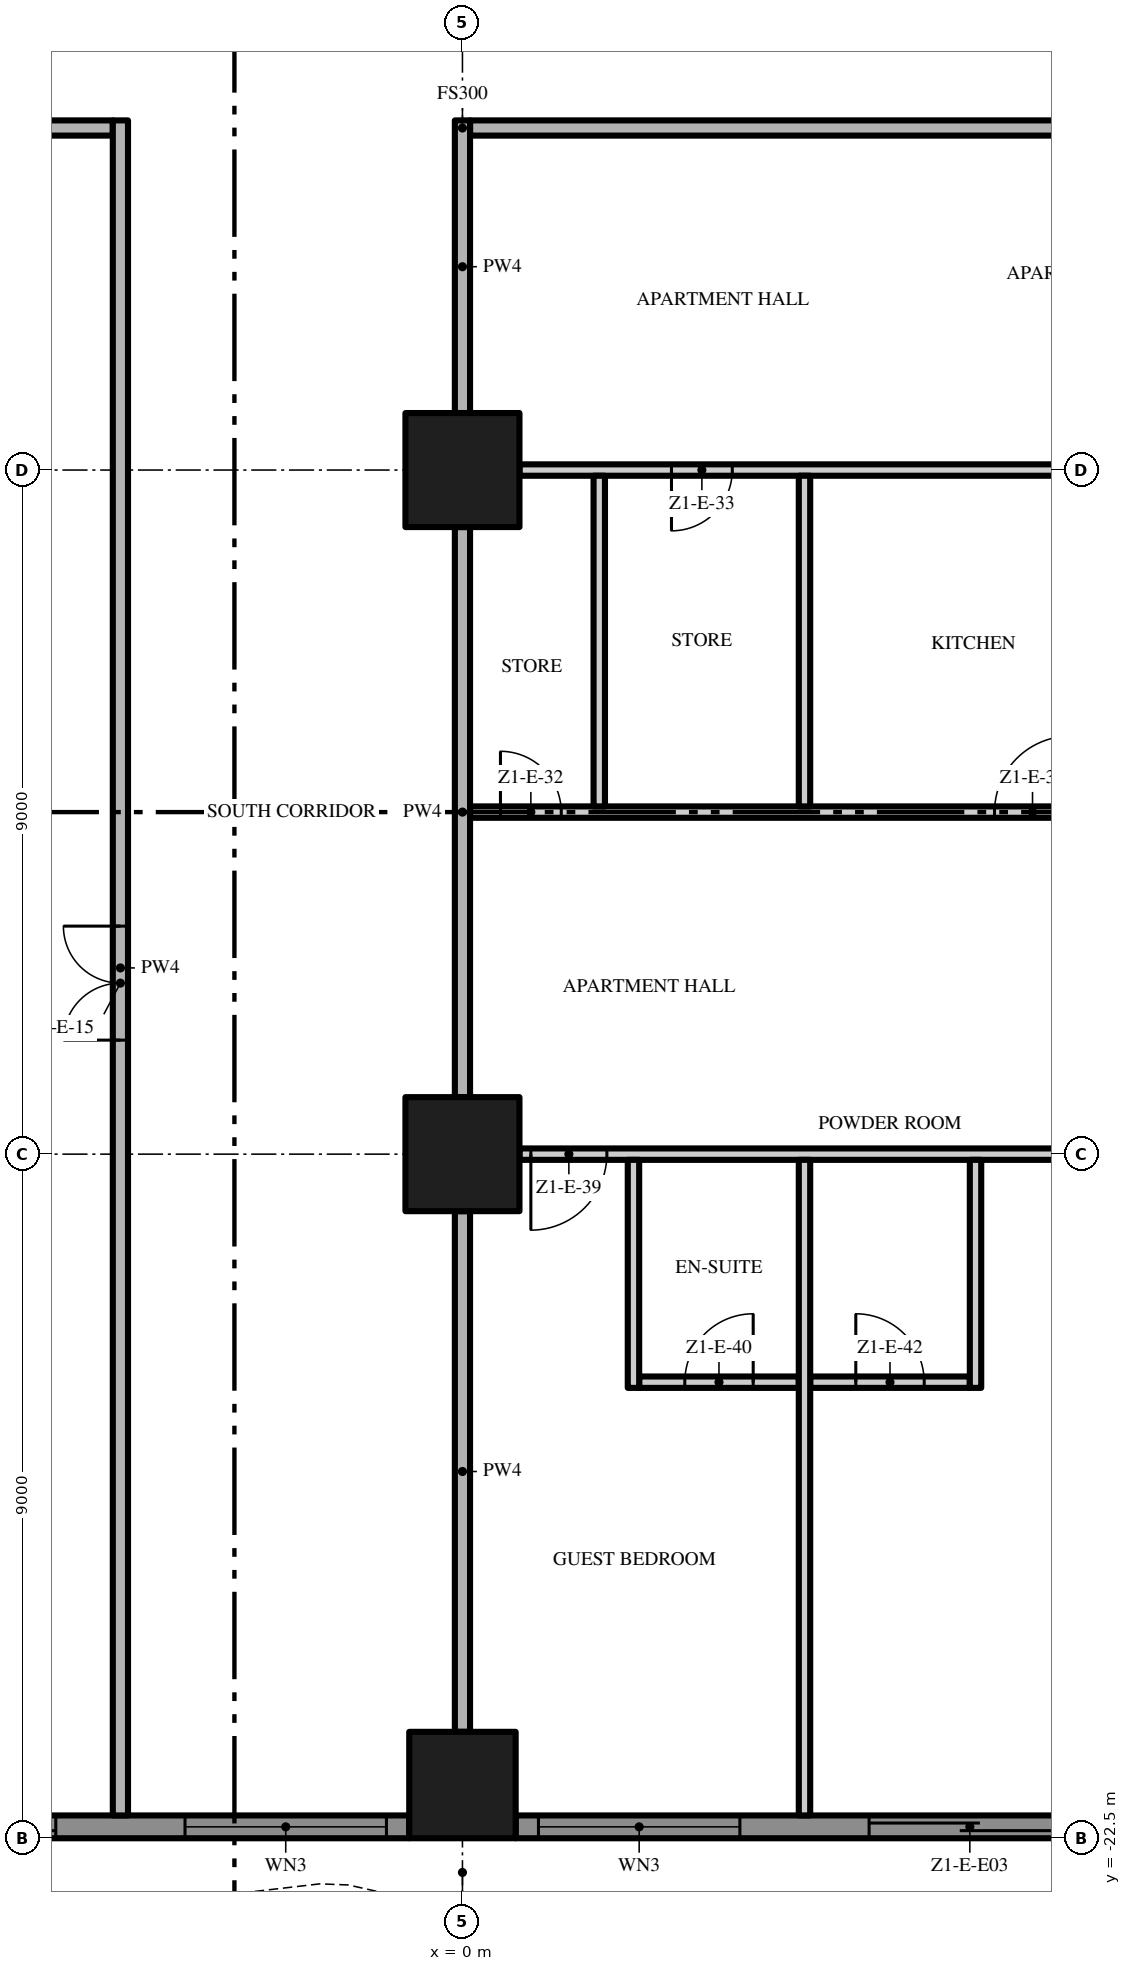
"""IFC4 building model, lengths in metres.
Left out: names, types, materials, properties, quantities, classifications, styles, units other than length and angle.
Written with IfcOpenShell. Run it as: python <this file> out.ifc"""

import sys

from ifc_helpers import new_model, si_unit, direction, frame, frame_2d, origin, origin_2d, place, context, subcontext, project, spatial, polyline, rectangle, outline, extrude, element, fill, save


model = new_model("IFC4")
c1 = context("Model", 3, precision=1e-05, world=origin(), true_north=direction((0.0, 1.0)))
c2 = subcontext(c1, "Body", "Model", "MODEL_VIEW")
j1 = project(units=[si_unit("LENGTHUNIT", "METRE"), si_unit("PLANEANGLEUNIT", "RADIAN")], contexts=[c1])
p1 = place(None, origin())
s1 = spatial("IfcSite", under=j1, at=p1, CompositionType="ELEMENT")
p2 = place(p1, origin())
s2 = spatial("IfcBuilding", under=s1, at=p2, CompositionType="ELEMENT")
p3 = place(p2, frame((0.0, 0.0, 56.8)))
s3 = spatial("IfcBuildingStorey", under=s2, at=p3, CompositionType="ELEMENT", Elevation=56.8)
p4 = place(p3, frame((0.0, -13.5, 0.0), z_axis=(0.0, 0.0, 1.0), x_axis=(1.0, 0.0, 0.0)))
e1 = element("IfcColumn", 1, at=p4, inside=s3, PredefinedType="COLUMN", context=c2, shape_type="SweptSolid", body=[
    extrude(rectangle(XDim=1.5, YDim=1.5, at=origin_2d()), origin(), (0.0, 0.0, 1.0), 3.5),
])
p5 = place(p3, frame((0.0, -21.8, 0.0), z_axis=(0.0, 0.0, 1.0), x_axis=(1.0, 0.0, 0.0)))
e2 = element("IfcColumn", 2, at=p5, inside=s3, PredefinedType="COLUMN", context=c2, shape_type="SweptSolid", body=[
    extrude(rectangle(XDim=1.4, YDim=1.4, at=origin_2d()), origin(), (0.0, 0.0, 1.0), 3.5),
])
p6 = place(p3, frame((0.0, -4.5, 0.0), z_axis=(0.0, 0.0, 1.0), x_axis=(1.0, 0.0, 0.0)))
e3 = element("IfcColumn", 3, at=p6, inside=s3, PredefinedType="COLUMN", context=c2, shape_type="SweptSolid", body=[
    extrude(rectangle(XDim=1.5, YDim=1.5, at=origin_2d()), origin(), (0.0, 0.0, 1.0), 3.5),
])
p7 = place(p3, frame((-0.7, -22.35, 0.0), z_axis=(0.0, 0.0, 1.0), x_axis=(-1.0, 0.0, 0.0)))
e4 = element("IfcWall", 4, at=p7, inside=s3, PredefinedType="SOLIDWALL", context=c2, shape_type="SweptSolid", body=[
    extrude(rectangle(XDim=7.6, YDim=0.3, at=frame_2d((3.8, 0.0))), origin(), (0.0, 0.0, 1.0), 3.5),
])
p8 = place(p7, frame((4.65, 0.0, 0.0)))
e5 = element("IfcOpeningElement", 5, at=p8, cuts=e4, PredefinedType="OPENING", context=c2, shape_type="SweptSolid", body=[
    extrude(rectangle(XDim=2.65, YDim=2.4, at=frame_2d((1.325, 1.2))), frame((0.0, 0.16, 0.0), z_axis=(0.0, -1.0, 0.0), x_axis=(1.0, 0.0, 0.0)), (0.0, 0.0, 1.0), 0.32),
])
p9 = place(p7, frame((0.3, 0.0, 0.45)))
e6 = element("IfcOpeningElement", 6, at=p9, cuts=e4, PredefinedType="OPENING", context=c2, shape_type="SweptSolid", body=[
    extrude(rectangle(XDim=2.65, YDim=2.65, at=frame_2d((1.325, 1.325))), frame((0.0, 0.16, 0.0), z_axis=(0.0, -1.0, 0.0), x_axis=(1.0, 0.0, 0.0)), (0.0, 0.0, 1.0), 0.32),
])
p10 = place(p3, frame((8.3, -22.35, 0.0), z_axis=(0.0, 0.0, 1.0), x_axis=(-1.0, 0.0, 0.0)))
e7 = element("IfcWall", 7, at=p10, inside=s3, PredefinedType="SOLIDWALL", context=c2, shape_type="SweptSolid", body=[
    extrude(rectangle(XDim=7.6, YDim=0.3, at=frame_2d((3.8, 0.0))), origin(), (0.0, 0.0, 1.0), 3.5),
])
p11 = place(p10, frame((4.65, 0.0, 0.45)))
e8 = element("IfcOpeningElement", 8, at=p11, cuts=e7, PredefinedType="OPENING", context=c2, shape_type="SweptSolid", body=[
    extrude(rectangle(XDim=2.65, YDim=2.65, at=frame_2d((1.325, 1.325))), frame((0.0, 0.16, 0.0), z_axis=(0.0, -1.0, 0.0), x_axis=(1.0, 0.0, 0.0)), (0.0, 0.0, 1.0), 0.32),
])
p12 = place(p10, frame((0.3, 0.0, 0.0)))
e9 = element("IfcOpeningElement", 9, at=p12, cuts=e7, PredefinedType="OPENING", context=c2, shape_type="SweptSolid", body=[
    extrude(rectangle(XDim=2.65, YDim=2.4, at=frame_2d((1.325, 1.2))), frame((0.0, 0.16, 0.0), z_axis=(0.0, -1.0, 0.0), x_axis=(1.0, 0.0, 0.0)), (0.0, 0.0, 1.0), 0.32),
])
p13 = place(p3, origin())
e10 = element("IfcWall", 10, at=p13, inside=s3, PredefinedType="USERDEFINED", context=c2, shape_type="SweptSolid", body=[
    extrude(outline(polyline([(-22.5, -25.149), (-21.0, -24.488), (-19.5, -23.755), (-18.0, -23.231), (-16.875, -23.1), (-16.5, -23.115), (-15.0, -23.451), (-13.5, -24.112), (-12.0, -24.845), (-10.5, -25.369), (-9.375, -25.5), (-9.0, -25.485), (-7.5, -25.149), (-6.0, -24.488), (-4.5, -23.755), (-3.0, -23.231), (-1.875, -23.1), (-1.5, -23.115), (0.0, -23.451), (1.5, -24.112), (3.0, -24.845), (4.5, -25.369), (5.625, -25.5), (6.0, -25.485), (7.5, -25.149), (9.0, -24.488), (10.5, -23.755), (12.0, -23.231), (13.125, -23.1), (13.5, -23.115), (15.0, -23.451), (16.5, -24.112), (18.0, -24.845), (19.5, -25.369), (20.625, -25.5), (21.0, -25.485), (22.5, -25.149), (22.445, -24.905), (20.967, -25.236), (20.635, -25.249), (19.556, -25.124), (18.096, -24.614), (16.605, -23.885), (15.079, -23.213), (13.533, -22.866), (13.115, -22.849), (11.944, -22.986), (10.404, -23.524), (8.895, -24.261), (7.421, -24.91), (5.967, -25.236), (5.635, -25.249), (4.556, -25.124), (3.096, -24.614), (1.605, -23.885), (0.079, -23.213), (-1.467, -22.866), (-1.885, -22.849), (-3.056, -22.986), (-4.596, -23.524), (-6.105, -24.261), (-7.579, -24.91), (-9.033, -25.236), (-9.365, -25.249), (-10.444, -25.124), (-11.904, -24.614), (-13.395, -23.885), (-14.921, -23.213), (-16.467, -22.866), (-16.885, -22.849), (-18.056, -22.986), (-19.596, -23.524), (-21.105, -24.261), (-22.601, -24.92), (-22.5, -25.149)])), origin(), (0.0, 0.0, 1.0), 0.9),
])
p14 = place(p3, frame((2.325, -16.5, 0.0), z_axis=(0.0, 0.0, 1.0), x_axis=(1.0, 0.0, 0.0)))
e11 = element("IfcWall", 11, at=p14, inside=s3, PredefinedType="PARTITIONING", context=c2, shape_type="SweptSolid", body=[
    extrude(rectangle(XDim=2.1, YDim=0.15, at=frame_2d((1.05, 0.0))), origin(), (0.0, 0.0, 1.0), 3.5),
])
p15 = place(p14, frame((0.6, 0.0, 0.0)))
e12 = element("IfcOpeningElement", 12, at=p15, cuts=e11, PredefinedType="OPENING", context=c2, shape_type="SweptSolid", body=[
    extrude(rectangle(XDim=0.9, YDim=2.1, at=frame_2d((0.45, 1.05))), frame((0.0, 0.085, 0.0), z_axis=(0.0, -1.0, 0.0), x_axis=(1.0, 0.0, 0.0)), (0.0, 0.0, 1.0), 0.17),
])
p16 = place(p3, frame((4.575, -16.5, 0.0), z_axis=(0.0, 0.0, 1.0), x_axis=(1.0, 0.0, 0.0)))
e13 = element("IfcWall", 13, at=p16, inside=s3, PredefinedType="PARTITIONING", context=c2, shape_type="SweptSolid", body=[
    extrude(rectangle(XDim=2.1, YDim=0.15, at=frame_2d((1.05, 0.0))), origin(), (0.0, 0.0, 1.0), 3.5),
])
p17 = place(p16, frame((0.6, 0.0, 0.0)))
e14 = element("IfcOpeningElement", 14, at=p17, cuts=e13, PredefinedType="OPENING", context=c2, shape_type="SweptSolid", body=[
    extrude(rectangle(XDim=0.9, YDim=2.1, at=frame_2d((0.45, 1.05))), frame((0.0, 0.085, 0.0), z_axis=(0.0, -1.0, 0.0), x_axis=(1.0, 0.0, 0.0)), (0.0, 0.0, 1.0), 0.17),
])
p18 = place(p3, frame((8.25, -13.5, 0.0), z_axis=(0.0, 0.0, 1.0), x_axis=(-1.0, 0.0, 0.0)))
e15 = element("IfcWall", 15, at=p18, inside=s3, PredefinedType="PARTITIONING", context=c2, shape_type="SweptSolid", body=[
    extrude(rectangle(XDim=7.5, YDim=0.15, at=frame_2d((3.75, 0.0))), origin(), (0.0, 0.0, 1.0), 3.5),
])
p19 = place(p18, frame((6.35, 0.0, 0.0)))
e16 = element("IfcOpeningElement", 16, at=p19, cuts=e15, PredefinedType="OPENING", context=c2, shape_type="SweptSolid", body=[
    extrude(rectangle(XDim=1.0, YDim=2.4, at=frame_2d((0.5, 1.2))), frame((0.0, 0.085, 0.0), z_axis=(0.0, -1.0, 0.0), x_axis=(1.0, 0.0, 0.0)), (0.0, 0.0, 1.0), 0.17),
])
p20 = place(p3, frame((0.1, -9.0, 0.0), z_axis=(0.0, 0.0, 1.0), x_axis=(1.0, 0.0, 0.0)))
e17 = element("IfcWall", 17, at=p20, inside=s3, PredefinedType="PARTITIONING", context=c2, shape_type="SweptSolid", body=[
    extrude(rectangle(XDim=13.4, YDim=0.15, at=frame_2d((6.7, 0.0))), origin(), (0.0, 0.0, 1.0), 3.5),
])
p21 = place(p20, frame((0.4, 0.0, 0.0)))
e18 = element("IfcOpeningElement", 18, at=p21, cuts=e17, PredefinedType="OPENING", context=c2, shape_type="SweptSolid", body=[
    extrude(rectangle(XDim=0.8, YDim=2.0, at=frame_2d((0.4, 1.0))), frame((0.0, 0.085, 0.0), z_axis=(0.0, -1.0, 0.0), x_axis=(1.0, 0.0, 0.0)), (0.0, 0.0, 1.0), 0.17),
])
p22 = place(p20, frame((6.9, 0.0, 0.0)))
e19 = element("IfcOpeningElement", 19, at=p22, cuts=e17, PredefinedType="OPENING", context=c2, shape_type="SweptSolid", body=[
    extrude(rectangle(XDim=1.0, YDim=2.4, at=frame_2d((0.5, 1.2))), frame((0.0, 0.085, 0.0), z_axis=(0.0, -1.0, 0.0), x_axis=(1.0, 0.0, 0.0)), (0.0, 0.0, 1.0), 0.17),
])
p23 = place(p3, frame((8.25, -4.5, 0.0), z_axis=(0.0, 0.0, 1.0), x_axis=(-1.0, 0.0, 0.0)))
e20 = element("IfcWall", 20, at=p23, inside=s3, PredefinedType="PARTITIONING", context=c2, shape_type="SweptSolid", body=[
    extrude(rectangle(XDim=7.5, YDim=0.15, at=frame_2d((3.75, 0.0))), origin(), (0.0, 0.0, 1.0), 3.5),
])
p24 = place(p23, frame((4.7, 0.0, 0.0)))
e21 = element("IfcOpeningElement", 21, at=p24, cuts=e20, PredefinedType="OPENING", context=c2, shape_type="SweptSolid", body=[
    extrude(rectangle(XDim=0.8, YDim=2.0, at=frame_2d((0.4, 1.0))), frame((0.0, 0.085, 0.0), z_axis=(0.0, -1.0, 0.0), x_axis=(1.0, 0.0, 0.0)), (0.0, 0.0, 1.0), 0.17),
])
p25 = place(p3, frame((-17.4, 0.0, 0.0), z_axis=(0.0, 0.0, 1.0), x_axis=(1.0, 0.0, 0.0)))
e22 = element("IfcWall", 22, at=p25, inside=s3, PredefinedType="PARTITIONING", context=c2, shape_type="SweptSolid", body=[
    extrude(rectangle(XDim=12.8, YDim=0.2, at=frame_2d((6.4, 0.0))), origin(), (0.0, 0.0, 1.0), 3.5),
])
p26 = place(p3, frame((17.4, 0.0, 0.0), z_axis=(0.0, 0.0, 1.0), x_axis=(-1.0, 0.0, 0.0)))
e23 = element("IfcWall", 23, at=p26, inside=s3, PredefinedType="PARTITIONING", context=c2, shape_type="SweptSolid", body=[
    extrude(rectangle(XDim=17.3, YDim=0.2, at=frame_2d((8.65, 0.0))), origin(), (0.0, 0.0, 1.0), 3.5),
])
p27 = place(p26, frame((7.65, 0.0, 0.0)))
e24 = element("IfcOpeningElement", 24, at=p27, cuts=e23, PredefinedType="OPENING", context=c2, shape_type="SweptSolid", body=[
    extrude(rectangle(XDim=1.5, YDim=2.4, at=frame_2d((0.75, 1.2))), frame((0.0, 0.11, 0.0), z_axis=(0.0, -1.0, 0.0), x_axis=(1.0, 0.0, 0.0)), (0.0, 0.0, 1.0), 0.22),
])
p28 = place(p3, frame((-4.5, -22.2, 0.0), z_axis=(0.0, 0.0, 1.0), x_axis=(0.0, 1.0, 0.0)))
e25 = element("IfcWall", 25, at=p28, inside=s3, PredefinedType="PARTITIONING", context=c2, shape_type="SweptSolid", body=[
    extrude(rectangle(XDim=22.3, YDim=0.2, at=frame_2d((11.15, 0.0))), origin(), (0.0, 0.0, 1.0), 3.5),
])
p29 = place(p28, frame((10.2, 0.0, 0.0)))
e26 = element("IfcOpeningElement", 26, at=p29, cuts=e25, PredefinedType="OPENING", context=c2, shape_type="SweptSolid", body=[
    extrude(rectangle(XDim=1.5, YDim=2.4, at=frame_2d((0.75, 1.2))), frame((0.0, 0.11, 0.0), z_axis=(0.0, -1.0, 0.0), x_axis=(1.0, 0.0, 0.0)), (0.0, 0.0, 1.0), 0.22),
])
p30 = place(p3, frame((0.0, -21.1, 0.0), z_axis=(0.0, 0.0, 1.0), x_axis=(0.0, 1.0, 0.0)))
e27 = element("IfcWall", 27, at=p30, inside=s3, PredefinedType="PARTITIONING", context=c2, shape_type="SweptSolid", body=[
    extrude(rectangle(XDim=6.85, YDim=0.2, at=frame_2d((3.425, 0.0))), origin(), (0.0, 0.0, 1.0), 3.5),
])
p31 = place(p3, frame((0.0, -12.75, 0.0), z_axis=(0.0, 0.0, 1.0), x_axis=(0.0, 1.0, 0.0)))
e28 = element("IfcWall", 28, at=p31, inside=s3, PredefinedType="PARTITIONING", context=c2, shape_type="SweptSolid", body=[
    extrude(rectangle(XDim=7.5, YDim=0.2, at=frame_2d((3.75, 0.0))), origin(), (0.0, 0.0, 1.0), 3.5),
])
p32 = place(p3, frame((0.0, -3.75, 0.0), z_axis=(0.0, 0.0, 1.0), x_axis=(0.0, 1.0, 0.0)))
e29 = element("IfcWall", 29, at=p32, inside=s3, PredefinedType="PARTITIONING", context=c2, shape_type="SweptSolid", body=[
    extrude(rectangle(XDim=3.85, YDim=0.2, at=frame_2d((1.925, 0.0))), origin(), (0.0, 0.0, 1.0), 3.5),
])
p33 = place(p3, frame((1.8, -8.925, 0.0), z_axis=(0.0, 0.0, 1.0), x_axis=(0.0, 1.0, 0.0)))
e30 = element("IfcWall", 30, at=p33, inside=s3, PredefinedType="PARTITIONING", context=c2, shape_type="SweptSolid", body=[
    extrude(rectangle(XDim=4.35, YDim=0.15, at=frame_2d((2.175, 0.0))), origin(), (0.0, 0.0, 1.0), 3.5),
])
p34 = place(p3, frame((2.25, -16.575, 0.0), z_axis=(0.0, 0.0, 1.0), x_axis=(0.0, 1.0, 0.0)))
e31 = element("IfcWall", 31, at=p34, inside=s3, PredefinedType="PARTITIONING", context=c2, shape_type="SweptSolid", body=[
    extrude(rectangle(XDim=3.0, YDim=0.15, at=frame_2d((1.5, 0.0))), origin(), (0.0, 0.0, 1.0), 3.5),
])
p35 = place(p3, frame((4.5, -22.2, 0.0), z_axis=(0.0, 0.0, 1.0), x_axis=(0.0, 1.0, 0.0)))
e32 = element("IfcWall", 32, at=p35, inside=s3, PredefinedType="PARTITIONING", context=c2, shape_type="SweptSolid", body=[
    extrude(rectangle(XDim=8.625, YDim=0.15, at=frame_2d((4.312, 0.0))), origin(), (0.0, 0.0, 1.0), 3.5),
])
p36 = place(p3, frame((4.5, -8.925, 0.0), z_axis=(0.0, 0.0, 1.0), x_axis=(0.0, 1.0, 0.0)))
e33 = element("IfcWall", 33, at=p36, inside=s3, PredefinedType="PARTITIONING", context=c2, shape_type="SweptSolid", body=[
    extrude(rectangle(XDim=4.35, YDim=0.15, at=frame_2d((2.175, 0.0))), origin(), (0.0, 0.0, 1.0), 3.5),
])
p37 = place(p3, frame((6.75, -16.575, 0.0), z_axis=(0.0, 0.0, 1.0), x_axis=(0.0, 1.0, 0.0)))
e34 = element("IfcWall", 34, at=p37, inside=s3, PredefinedType="PARTITIONING", context=c2, shape_type="SweptSolid", body=[
    extrude(rectangle(XDim=3.0, YDim=0.15, at=frame_2d((1.5, 0.0))), origin(), (0.0, 0.0, 1.0), 3.5),
])
p38 = place(p8, origin())
e35 = element("IfcDoor", 35, at=p38, inside=s3, OperationType="SINGLE_SWING_LEFT", PredefinedType="DOOR", context=c2, shape_type="SweptSolid", body=[
    extrude(rectangle(XDim=2.65, YDim=2.4, at=frame_2d((1.325, 1.2))), frame((0.0, 0.025, 0.0), z_axis=(0.0, -1.0, 0.0), x_axis=(1.0, 0.0, 0.0)), (0.0, 0.0, 1.0), 0.05),
])
fill(e5, e35)
p39 = place(p9, origin())
e36 = element("IfcWindow", 36, at=p39, inside=s3, PartitioningType="SINGLE_PANEL", PredefinedType="WINDOW", context=c2, shape_type="SweptSolid", body=[
    extrude(rectangle(XDim=2.65, YDim=2.65, at=frame_2d((1.325, 1.325))), frame((0.0, 0.03, 0.0), z_axis=(0.0, -1.0, 0.0), x_axis=(1.0, 0.0, 0.0)), (0.0, 0.0, 1.0), 0.06),
])
fill(e6, e36)
p40 = place(p11, origin())
e37 = element("IfcWindow", 37, at=p40, inside=s3, PartitioningType="SINGLE_PANEL", PredefinedType="WINDOW", context=c2, shape_type="SweptSolid", body=[
    extrude(rectangle(XDim=2.65, YDim=2.65, at=frame_2d((1.325, 1.325))), frame((0.0, 0.03, 0.0), z_axis=(0.0, -1.0, 0.0), x_axis=(1.0, 0.0, 0.0)), (0.0, 0.0, 1.0), 0.06),
])
fill(e8, e37)
p41 = place(p12, origin())
e38 = element("IfcDoor", 38, at=p41, inside=s3, OperationType="SINGLE_SWING_LEFT", PredefinedType="DOOR", context=c2, shape_type="SweptSolid", body=[
    extrude(rectangle(XDim=2.65, YDim=2.4, at=frame_2d((1.325, 1.2))), frame((0.0, 0.025, 0.0), z_axis=(0.0, -1.0, 0.0), x_axis=(1.0, 0.0, 0.0)), (0.0, 0.0, 1.0), 0.05),
])
fill(e9, e38)
p42 = place(p29, origin())
e39 = element("IfcDoor", 39, at=p42, inside=s3, OperationType="DOUBLE_DOOR_SINGLE_SWING", PredefinedType="DOOR", context=c2, shape_type="SweptSolid", body=[
    extrude(rectangle(XDim=1.5, YDim=2.4, at=frame_2d((0.75, 1.2))), frame((0.0, 0.025, 0.0), z_axis=(0.0, -1.0, 0.0), x_axis=(1.0, 0.0, 0.0)), (0.0, 0.0, 1.0), 0.05),
])
fill(e26, e39)
p43 = place(p21, origin())
e40 = element("IfcDoor", 40, at=p43, inside=s3, OperationType="SINGLE_SWING_LEFT", PredefinedType="DOOR", context=c2, shape_type="SweptSolid", body=[
    extrude(rectangle(XDim=0.8, YDim=2.0, at=frame_2d((0.4, 1.0))), frame((0.0, 0.025, 0.0), z_axis=(0.0, -1.0, 0.0), x_axis=(1.0, 0.0, 0.0)), (0.0, 0.0, 1.0), 0.05),
])
fill(e18, e40)
p44 = place(p24, origin())
e41 = element("IfcDoor", 41, at=p44, inside=s3, OperationType="SINGLE_SWING_RIGHT", PredefinedType="DOOR", context=c2, shape_type="SweptSolid", body=[
    extrude(rectangle(XDim=0.8, YDim=2.0, at=frame_2d((0.4, 1.0))), frame((0.0, 0.025, 0.0), z_axis=(0.0, -1.0, 0.0), x_axis=(1.0, 0.0, 0.0)), (0.0, 0.0, 1.0), 0.05),
])
fill(e21, e41)
p45 = place(p22, origin())
e42 = element("IfcDoor", 42, at=p45, inside=s3, OperationType="SINGLE_SWING_RIGHT", PredefinedType="DOOR", context=c2, shape_type="SweptSolid", body=[
    extrude(rectangle(XDim=1.0, YDim=2.4, at=frame_2d((0.5, 1.2))), frame((0.0, 0.025, 0.0), z_axis=(0.0, -1.0, 0.0), x_axis=(1.0, 0.0, 0.0)), (0.0, 0.0, 1.0), 0.05),
])
fill(e19, e42)
p46 = place(p19, origin())
e43 = element("IfcDoor", 43, at=p46, inside=s3, OperationType="SINGLE_SWING_RIGHT", PredefinedType="DOOR", context=c2, shape_type="SweptSolid", body=[
    extrude(rectangle(XDim=1.0, YDim=2.4, at=frame_2d((0.5, 1.2))), frame((0.0, 0.025, 0.0), z_axis=(0.0, -1.0, 0.0), x_axis=(1.0, 0.0, 0.0)), (0.0, 0.0, 1.0), 0.05),
])
fill(e16, e43)
p47 = place(p15, origin())
e44 = element("IfcDoor", 44, at=p47, inside=s3, OperationType="SINGLE_SWING_RIGHT", PredefinedType="DOOR", context=c2, shape_type="SweptSolid", body=[
    extrude(rectangle(XDim=0.9, YDim=2.1, at=frame_2d((0.45, 1.05))), frame((0.0, 0.025, 0.0), z_axis=(0.0, -1.0, 0.0), x_axis=(1.0, 0.0, 0.0)), (0.0, 0.0, 1.0), 0.05),
])
fill(e12, e44)
p48 = place(p17, origin())
e45 = element("IfcDoor", 45, at=p48, inside=s3, OperationType="SINGLE_SWING_LEFT", PredefinedType="DOOR", context=c2, shape_type="SweptSolid", body=[
    extrude(rectangle(XDim=0.9, YDim=2.1, at=frame_2d((0.45, 1.05))), frame((0.0, 0.025, 0.0), z_axis=(0.0, -1.0, 0.0), x_axis=(1.0, 0.0, 0.0)), (0.0, 0.0, 1.0), 0.05),
])
fill(e14, e45)
save(model, sys.argv[1])
